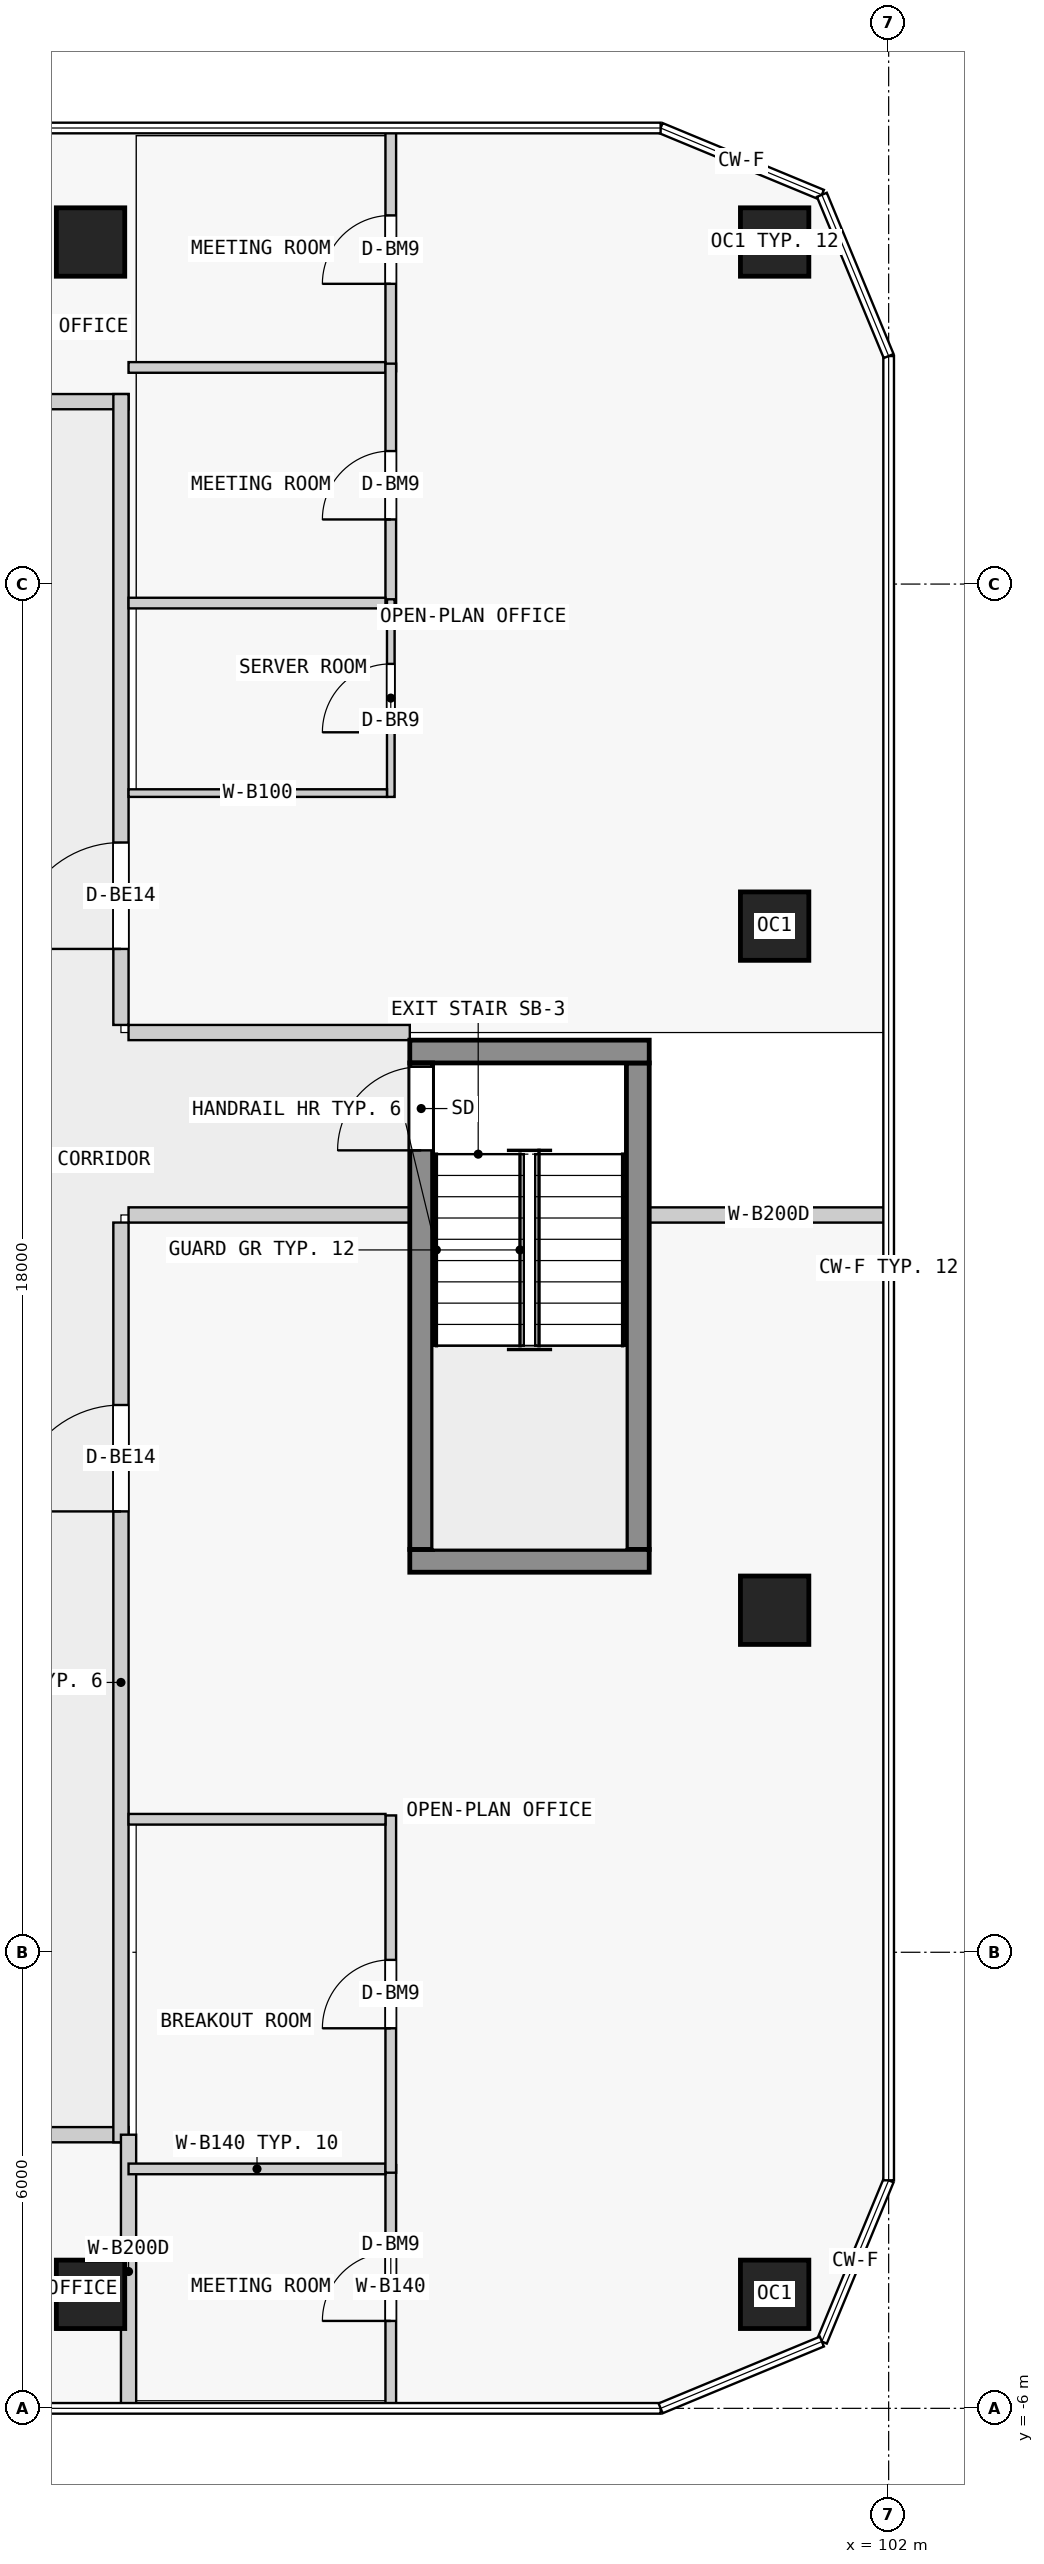
"""IFC4 building model, lengths in metres.
Left out: names, types, materials, properties, quantities, classifications, styles, units other than length and angle.
Written with IfcOpenShell. Run it as: python <this file> out.ifc"""

import sys

from ifc_helpers import new_model, si_unit, direction, frame, frame_2d, origin, origin_2d, place, context, subcontext, project, spatial, rectangle, extrude, element, fill, save


model = new_model("IFC4")
c1 = context("Model", 3, precision=1e-05, world=origin(), true_north=direction((0.0, 1.0)))
c2 = subcontext(c1, "Body", "Model", "MODEL_VIEW")
j1 = project(units=[si_unit("LENGTHUNIT", "METRE"), si_unit("PLANEANGLEUNIT", "RADIAN")], contexts=[c1])
p1 = place(None, origin())
s1 = spatial("IfcSite", under=j1, at=p1, CompositionType="ELEMENT")
p2 = place(p1, origin())
s2 = spatial("IfcBuilding", under=s1, at=p2, CompositionType="ELEMENT")
p3 = place(p2, frame((0.0, 0.0, 92.3)))
s3 = spatial("IfcBuildingStorey", under=s2, at=p3, CompositionType="ELEMENT", Elevation=92.3)
for number, where, z_axis, x_axis in (
    (1, (91.5, -4.5, 0.0), (0.0, 0.0, 1.0), (1.0, 0.0, 0.0)),
    (2, (100.5, -4.5, 0.0), (0.0, 0.0, 1.0), (1.0, 0.0, 0.0)),
    (3, (100.5, 4.5, 0.0), (0.0, 0.0, 1.0), (1.0, 0.0, 0.0)),
    (4, (100.5, 13.5, 0.0), (0.0, 0.0, 1.0), (1.0, 0.0, 0.0)),
    (5, (100.5, 22.5, 0.0), (0.0, 0.0, 1.0), (1.0, 0.0, 0.0)),
    (6, (91.5, 22.5, 0.0), (0.0, 0.0, 1.0), (1.0, 0.0, 0.0)),
):
    element("IfcColumn", number, at=place(p3, frame(where, z_axis=z_axis, x_axis=x_axis)), inside=s3, PredefinedType="COLUMN", context=c2, shape_type="SweptSolid", body=[
        extrude(rectangle(XDim=0.9, YDim=0.9, at=origin_2d()), origin(), (0.0, 0.0, 1.0), 3.5),
    ])
p4 = place(p3, frame((95.85, 5.3, 0.0), z_axis=(0.0, 0.0, 1.0), x_axis=(0.0, 1.0, 0.0)))
e7 = element("IfcWall", 7, at=p4, inside=s3, PredefinedType="SHEAR", context=c2, shape_type="SweptSolid", body=[
    extrude(rectangle(XDim=6.4, YDim=0.3, at=frame_2d((3.2, 0.0))), origin(), (0.0, 0.0, 1.0), 3.25),
])
p5 = place(p4, frame((5.25, 0.0, 0.0)))
e8 = element("IfcOpeningElement", 8, at=p5, cuts=e7, PredefinedType="OPENING", context=c2, shape_type="SweptSolid", body=[
    extrude(rectangle(XDim=1.1, YDim=2.1, at=frame_2d((0.55, 1.05))), frame((0.0, 0.16, 0.0), z_axis=(0.0, -1.0, 0.0), x_axis=(1.0, 0.0, 0.0)), (0.0, 0.0, 1.0), 0.32),
])
p6 = place(p3, frame((98.7, 5.3, 0.0), z_axis=(0.0, 0.0, 1.0), x_axis=(0.0, 1.0, 0.0)))
e9 = element("IfcWall", 9, at=p6, inside=s3, PredefinedType="SHEAR", context=c2, shape_type="SweptSolid", body=[
    extrude(rectangle(XDim=6.4, YDim=0.3, at=frame_2d((3.2, 0.0))), origin(), (0.0, 0.0, 1.0), 3.25),
])
for number, where, z_axis, x_axis in (
    (10, (95.7, 5.15, 0.0), (0.0, 0.0, 1.0), (1.0, 0.0, 0.0)),
    (11, (95.7, 11.85, 0.0), (0.0, 0.0, 1.0), (1.0, 0.0, 0.0)),
):
    element("IfcWall", number, at=place(p3, frame(where, z_axis=z_axis, x_axis=x_axis)), inside=s3, PredefinedType="SHEAR", context=c2, shape_type="SweptSolid", body=[
        extrude(rectangle(XDim=3.15, YDim=0.3, at=frame_2d((1.575, 0.0))), origin(), (0.0, 0.0, 1.0), 3.25),
    ])
p7 = place(p3, frame((72.0, -2.4, 0.0), z_axis=(0.0, 0.0, 1.0), x_axis=(1.0, 0.0, 0.0)))
e12 = element("IfcWall", 12, at=p7, inside=s3, PredefinedType="PARTITIONING", context=c2, shape_type="SweptSolid", body=[
    extrude(rectangle(XDim=20.0, YDim=0.2, at=frame_2d((10.0, 0.0))), origin(), (0.0, 0.0, 1.0), 3.25),
])
p8 = place(p7, frame((11.5, 0.0, 0.0)))
e13 = element("IfcOpeningElement", 13, at=p8, cuts=e12, PredefinedType="OPENING", context=c2, shape_type="SweptSolid", body=[
    extrude(rectangle(XDim=1.0, YDim=2.4, at=frame_2d((0.5, 1.2))), frame((0.0, 0.11, 0.0), z_axis=(0.0, -1.0, 0.0), x_axis=(1.0, 0.0, 0.0)), (0.0, 0.0, 1.0), 0.22),
])
p9 = place(p3, frame((72.0, 20.4, 0.0), z_axis=(0.0, 0.0, 1.0), x_axis=(1.0, 0.0, 0.0)))
e14 = element("IfcWall", 14, at=p9, inside=s3, PredefinedType="PARTITIONING", context=c2, shape_type="SweptSolid", body=[
    extrude(rectangle(XDim=20.0, YDim=0.2, at=frame_2d((10.0, 0.0))), origin(), (0.0, 0.0, 1.0), 3.25),
])
p10 = place(p3, frame((91.9, -2.5, 0.0), z_axis=(0.0, 0.0, 1.0), x_axis=(0.0, 1.0, 0.0)))
e15 = element("IfcWall", 15, at=p10, inside=s3, PredefinedType="PARTITIONING", context=c2, shape_type="SweptSolid", body=[
    extrude(rectangle(XDim=12.1, YDim=0.2, at=frame_2d((6.05, 0.0))), origin(), (0.0, 0.0, 1.0), 3.25),
])
p11 = place(p10, frame((8.3, 0.0, 0.0)))
e16 = element("IfcOpeningElement", 16, at=p11, cuts=e15, PredefinedType="OPENING", context=c2, shape_type="SweptSolid", body=[
    extrude(rectangle(XDim=1.4, YDim=2.4, at=frame_2d((0.7, 1.2))), frame((0.0, 0.11, 0.0), z_axis=(0.0, -1.0, 0.0), x_axis=(1.0, 0.0, 0.0)), (0.0, 0.0, 1.0), 0.22),
])
p12 = place(p3, frame((91.9, 12.2, 0.0), z_axis=(0.0, 0.0, 1.0), x_axis=(0.0, 1.0, 0.0)))
e17 = element("IfcWall", 17, at=p12, inside=s3, PredefinedType="PARTITIONING", context=c2, shape_type="SweptSolid", body=[
    extrude(rectangle(XDim=8.3, YDim=0.2, at=frame_2d((4.15, 0.0))), origin(), (0.0, 0.0, 1.0), 3.25),
])
p13 = place(p12, frame((1.0, 0.0, 0.0)))
e18 = element("IfcOpeningElement", 18, at=p13, cuts=e17, PredefinedType="OPENING", context=c2, shape_type="SweptSolid", body=[
    extrude(rectangle(XDim=1.4, YDim=2.4, at=frame_2d((0.7, 1.2))), frame((0.0, 0.11, 0.0), z_axis=(0.0, -1.0, 0.0), x_axis=(1.0, 0.0, 0.0)), (0.0, 0.0, 1.0), 0.22),
])
for number, where, z_axis, x_axis in (
    (19, (92.0, 9.7, 0.0), (0.0, 0.0, 1.0), (1.0, 0.0, 0.0)),
    (20, (92.0, 12.1, 0.0), (0.0, 0.0, 1.0), (1.0, 0.0, 0.0)),
):
    element("IfcWall", number, at=place(p3, frame(where, z_axis=z_axis, x_axis=x_axis)), inside=s3, PredefinedType="PARTITIONING", context=c2, shape_type="SweptSolid", body=[
        extrude(rectangle(XDim=3.7, YDim=0.2, at=frame_2d((1.85, 0.0))), origin(), (0.0, 0.0, 1.0), 3.25),
    ])
p14 = place(p3, frame((98.85, 9.7, 0.0), z_axis=(0.0, 0.0, 1.0), x_axis=(1.0, 0.0, 0.0)))
e21 = element("IfcWall", 21, at=p14, inside=s3, PredefinedType="PARTITIONING", context=c2, shape_type="SweptSolid", body=[
    extrude(rectangle(XDim=3.15, YDim=0.2, at=frame_2d((1.575, 0.0))), origin(), (0.0, 0.0, 1.0), 3.25),
])
p15 = place(p3, frame((92.0, -6.0, 0.0), z_axis=(0.0, 0.0, 1.0), x_axis=(0.0, 1.0, 0.0)))
e22 = element("IfcWall", 22, at=p15, inside=s3, PredefinedType="PARTITIONING", context=c2, shape_type="SweptSolid", body=[
    extrude(rectangle(XDim=3.6, YDim=0.2, at=frame_2d((1.8, 0.0))), origin(), (0.0, 0.0, 1.0), 3.25),
])
p16 = place(p3, frame((95.45, -6.0, 0.0), z_axis=(0.0, 0.0, 1.0), x_axis=(0.0, 1.0, 0.0)))
e23 = element("IfcWall", 23, at=p16, inside=s3, PredefinedType="PARTITIONING", context=c2, shape_type="SweptSolid", body=[
    extrude(rectangle(XDim=3.2, YDim=0.14, at=frame_2d((1.6, 0.0))), origin(), (0.0, 0.0, 1.0), 3.25),
])
p17 = place(p16, frame((1.15, 0.0, 0.0)))
e24 = element("IfcOpeningElement", 24, at=p17, cuts=e23, PredefinedType="OPENING", context=c2, shape_type="SweptSolid", body=[
    extrude(rectangle(XDim=0.9, YDim=2.4, at=frame_2d((0.45, 1.2))), frame((0.0, 0.08, 0.0), z_axis=(0.0, -1.0, 0.0), x_axis=(1.0, 0.0, 0.0)), (0.0, 0.0, 1.0), 0.16),
])
p18 = place(p3, frame((92.0, -2.85, 0.0), z_axis=(0.0, 0.0, 1.0), x_axis=(1.0, 0.0, 0.0)))
e25 = element("IfcWall", 25, at=p18, inside=s3, PredefinedType="PARTITIONING", context=c2, shape_type="SweptSolid", body=[
    extrude(rectangle(XDim=3.38, YDim=0.14, at=frame_2d((1.69, 0.0))), origin(), (0.0, 0.0, 1.0), 3.25),
])
p19 = place(p3, frame((95.45, -2.9, 0.0), z_axis=(0.0, 0.0, 1.0), x_axis=(0.0, 1.0, 0.0)))
e26 = element("IfcWall", 26, at=p19, inside=s3, PredefinedType="PARTITIONING", context=c2, shape_type="SweptSolid", body=[
    extrude(rectangle(XDim=4.7, YDim=0.14, at=frame_2d((2.35, 0.0))), origin(), (0.0, 0.0, 1.0), 3.25),
])
p20 = place(p19, frame((1.9, 0.0, 0.0)))
e27 = element("IfcOpeningElement", 27, at=p20, cuts=e26, PredefinedType="OPENING", context=c2, shape_type="SweptSolid", body=[
    extrude(rectangle(XDim=0.9, YDim=2.4, at=frame_2d((0.45, 1.2))), frame((0.0, 0.08, 0.0), z_axis=(0.0, -1.0, 0.0), x_axis=(1.0, 0.0, 0.0)), (0.0, 0.0, 1.0), 0.16),
])
p21 = place(p3, frame((92.0, 1.75, 0.0), z_axis=(0.0, 0.0, 1.0), x_axis=(1.0, 0.0, 0.0)))
e28 = element("IfcWall", 28, at=p21, inside=s3, PredefinedType="PARTITIONING", context=c2, shape_type="SweptSolid", body=[
    extrude(rectangle(XDim=3.38, YDim=0.14, at=frame_2d((1.69, 0.0))), origin(), (0.0, 0.0, 1.0), 3.25),
])
p22 = place(p3, frame((95.45, 20.8, 0.0), z_axis=(0.0, 0.0, 1.0), x_axis=(0.0, 1.0, 0.0)))
e29 = element("IfcWall", 29, at=p22, inside=s3, PredefinedType="PARTITIONING", context=c2, shape_type="SweptSolid", body=[
    extrude(rectangle(XDim=3.2, YDim=0.14, at=frame_2d((1.6, 0.0))), origin(), (0.0, 0.0, 1.0), 3.25),
])
p23 = place(p22, frame((1.15, 0.0, 0.0)))
e30 = element("IfcOpeningElement", 30, at=p23, cuts=e29, PredefinedType="OPENING", context=c2, shape_type="SweptSolid", body=[
    extrude(rectangle(XDim=0.9, YDim=2.4, at=frame_2d((0.45, 1.2))), frame((0.0, 0.08, 0.0), z_axis=(0.0, -1.0, 0.0), x_axis=(1.0, 0.0, 0.0)), (0.0, 0.0, 1.0), 0.16),
])
p24 = place(p3, frame((92.0, 20.85, 0.0), z_axis=(0.0, 0.0, 1.0), x_axis=(1.0, 0.0, 0.0)))
e31 = element("IfcWall", 31, at=p24, inside=s3, PredefinedType="PARTITIONING", context=c2, shape_type="SweptSolid", body=[
    extrude(rectangle(XDim=3.38, YDim=0.14, at=frame_2d((1.69, 0.0))), origin(), (0.0, 0.0, 1.0), 3.25),
])
p25 = place(p3, frame((95.45, 17.7, 0.0), z_axis=(0.0, 0.0, 1.0), x_axis=(0.0, 1.0, 0.0)))
e32 = element("IfcWall", 32, at=p25, inside=s3, PredefinedType="PARTITIONING", context=c2, shape_type="SweptSolid", body=[
    extrude(rectangle(XDim=3.2, YDim=0.14, at=frame_2d((1.6, 0.0))), origin(), (0.0, 0.0, 1.0), 3.25),
])
p26 = place(p25, frame((1.15, 0.0, 0.0)))
e33 = element("IfcOpeningElement", 33, at=p26, cuts=e32, PredefinedType="OPENING", context=c2, shape_type="SweptSolid", body=[
    extrude(rectangle(XDim=0.9, YDim=2.4, at=frame_2d((0.45, 1.2))), frame((0.0, 0.08, 0.0), z_axis=(0.0, -1.0, 0.0), x_axis=(1.0, 0.0, 0.0)), (0.0, 0.0, 1.0), 0.16),
])
p27 = place(p3, frame((92.0, 17.75, 0.0), z_axis=(0.0, 0.0, 1.0), x_axis=(1.0, 0.0, 0.0)))
e34 = element("IfcWall", 34, at=p27, inside=s3, PredefinedType="PARTITIONING", context=c2, shape_type="SweptSolid", body=[
    extrude(rectangle(XDim=3.38, YDim=0.14, at=frame_2d((1.69, 0.0))), origin(), (0.0, 0.0, 1.0), 3.25),
])
p28 = place(p3, frame((95.45, 15.2, 0.0), z_axis=(0.0, 0.0, 1.0), x_axis=(0.0, 1.0, 0.0)))
e35 = element("IfcWall", 35, at=p28, inside=s3, PredefinedType="PARTITIONING", context=c2, shape_type="SweptSolid", body=[
    extrude(rectangle(XDim=2.6, YDim=0.1, at=frame_2d((1.3, 0.0))), origin(), (0.0, 0.0, 1.0), 3.25),
])
p29 = place(p28, frame((0.85, 0.0, 0.0)))
e36 = element("IfcOpeningElement", 36, at=p29, cuts=e35, PredefinedType="OPENING", context=c2, shape_type="SweptSolid", body=[
    extrude(rectangle(XDim=0.9, YDim=2.1, at=frame_2d((0.45, 1.05))), frame((0.0, 0.06, 0.0), z_axis=(0.0, -1.0, 0.0), x_axis=(1.0, 0.0, 0.0)), (0.0, 0.0, 1.0), 0.12),
])
p30 = place(p3, frame((92.0, 15.25, 0.0), z_axis=(0.0, 0.0, 1.0), x_axis=(1.0, 0.0, 0.0)))
e37 = element("IfcWall", 37, at=p30, inside=s3, PredefinedType="PARTITIONING", context=c2, shape_type="SweptSolid", body=[
    extrude(rectangle(XDim=3.4, YDim=0.1, at=frame_2d((1.7, 0.0))), origin(), (0.0, 0.0, 1.0), 3.25),
])
p31 = place(p5, origin())
e38 = element("IfcDoor", 38, at=p31, inside=s3, OperationType="SINGLE_SWING_LEFT", PredefinedType="DOOR", context=c2, shape_type="SweptSolid", body=[
    extrude(rectangle(XDim=1.1, YDim=2.1, at=frame_2d((0.55, 1.05))), frame((0.0, 0.025, 0.0), z_axis=(0.0, -1.0, 0.0), x_axis=(1.0, 0.0, 0.0)), (0.0, 0.0, 1.0), 0.05),
])
fill(e8, e38)
p32 = place(p11, origin())
e39 = element("IfcDoor", 39, at=p32, inside=s3, OperationType="DOUBLE_DOOR_SINGLE_SWING", PredefinedType="DOOR", context=c2, shape_type="SweptSolid", body=[
    extrude(rectangle(XDim=1.4, YDim=2.4, at=frame_2d((0.7, 1.2))), frame((0.0, 0.025, 0.0), z_axis=(0.0, -1.0, 0.0), x_axis=(1.0, 0.0, 0.0)), (0.0, 0.0, 1.0), 0.05),
])
fill(e16, e39)
p33 = place(p13, origin())
e40 = element("IfcDoor", 40, at=p33, inside=s3, OperationType="DOUBLE_DOOR_SINGLE_SWING", PredefinedType="DOOR", context=c2, shape_type="SweptSolid", body=[
    extrude(rectangle(XDim=1.4, YDim=2.4, at=frame_2d((0.7, 1.2))), frame((0.0, 0.025, 0.0), z_axis=(0.0, -1.0, 0.0), x_axis=(1.0, 0.0, 0.0)), (0.0, 0.0, 1.0), 0.05),
])
fill(e18, e40)
p34 = place(p17, origin())
e41 = element("IfcDoor", 41, at=p34, inside=s3, OperationType="SINGLE_SWING_LEFT", PredefinedType="DOOR", context=c2, shape_type="SweptSolid", body=[
    extrude(rectangle(XDim=0.9, YDim=2.4, at=frame_2d((0.45, 1.2))), frame((0.0, 0.025, 0.0), z_axis=(0.0, -1.0, 0.0), x_axis=(1.0, 0.0, 0.0)), (0.0, 0.0, 1.0), 0.05),
])
fill(e24, e41)
p35 = place(p20, origin())
e42 = element("IfcDoor", 42, at=p35, inside=s3, OperationType="SINGLE_SWING_LEFT", PredefinedType="DOOR", context=c2, shape_type="SweptSolid", body=[
    extrude(rectangle(XDim=0.9, YDim=2.4, at=frame_2d((0.45, 1.2))), frame((0.0, 0.025, 0.0), z_axis=(0.0, -1.0, 0.0), x_axis=(1.0, 0.0, 0.0)), (0.0, 0.0, 1.0), 0.05),
])
fill(e27, e42)
p36 = place(p23, origin())
e43 = element("IfcDoor", 43, at=p36, inside=s3, OperationType="SINGLE_SWING_LEFT", PredefinedType="DOOR", context=c2, shape_type="SweptSolid", body=[
    extrude(rectangle(XDim=0.9, YDim=2.4, at=frame_2d((0.45, 1.2))), frame((0.0, 0.025, 0.0), z_axis=(0.0, -1.0, 0.0), x_axis=(1.0, 0.0, 0.0)), (0.0, 0.0, 1.0), 0.05),
])
fill(e30, e43)
p37 = place(p26, origin())
e44 = element("IfcDoor", 44, at=p37, inside=s3, OperationType="SINGLE_SWING_LEFT", PredefinedType="DOOR", context=c2, shape_type="SweptSolid", body=[
    extrude(rectangle(XDim=0.9, YDim=2.4, at=frame_2d((0.45, 1.2))), frame((0.0, 0.025, 0.0), z_axis=(0.0, -1.0, 0.0), x_axis=(1.0, 0.0, 0.0)), (0.0, 0.0, 1.0), 0.05),
])
fill(e33, e44)
p38 = place(p29, origin())
e45 = element("IfcDoor", 45, at=p38, inside=s3, OperationType="SINGLE_SWING_LEFT", PredefinedType="DOOR", context=c2, shape_type="SweptSolid", body=[
    extrude(rectangle(XDim=0.9, YDim=2.1, at=frame_2d((0.45, 1.05))), frame((0.0, 0.025, 0.0), z_axis=(0.0, -1.0, 0.0), x_axis=(1.0, 0.0, 0.0)), (0.0, 0.0, 1.0), 0.05),
])
fill(e36, e45)
save(model, sys.argv[1])
